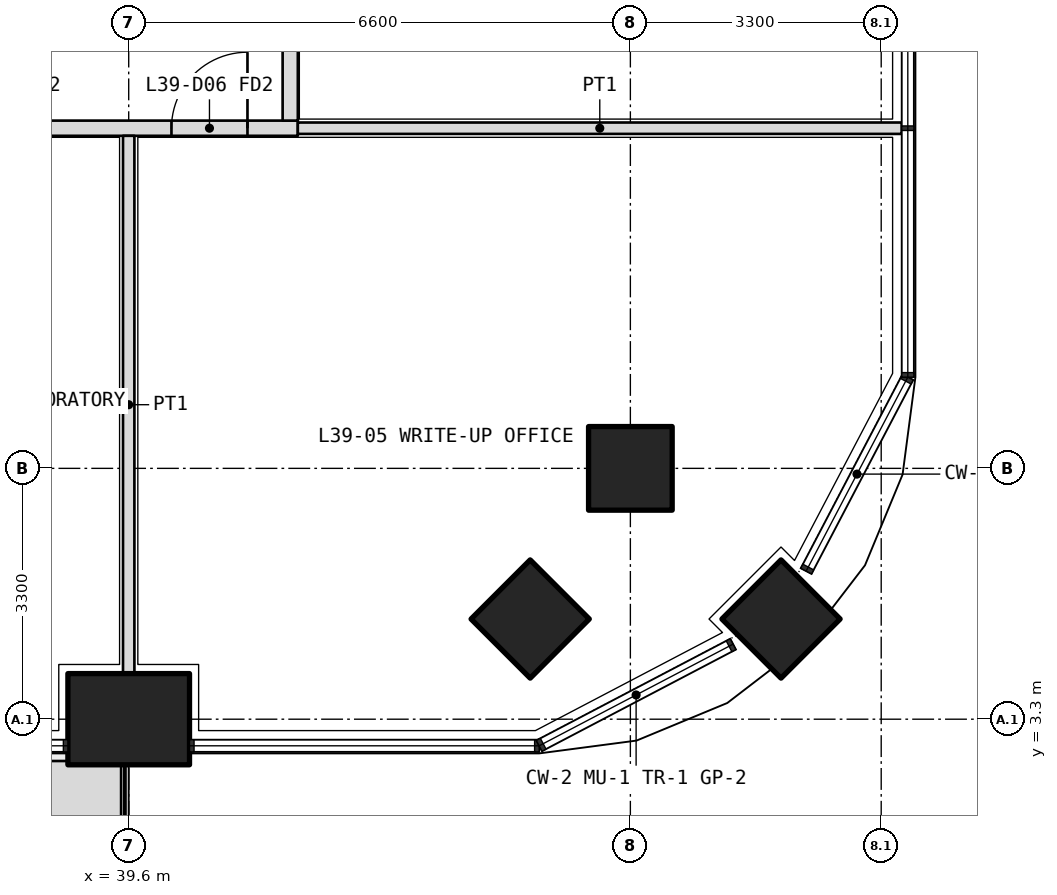
"""IFC4 building model, lengths in metres.
Left out: names, types, materials, properties, quantities, classifications, styles, units other than length and angle.
Written with IfcOpenShell. Run it as: python <this file> out.ifc"""

import sys

from ifc_helpers import new_model, si_unit, direction, frame, frame_2d, origin, origin_2d, place, context, subcontext, project, spatial, polyline, rectangle, outline, extrude, element, fill, save


model = new_model("IFC4")
c1 = context("Model", 3, precision=1e-05, world=origin(), true_north=direction((0.0, 1.0)))
c2 = subcontext(c1, "Body", "Model", "MODEL_VIEW")
j1 = project(units=[si_unit("LENGTHUNIT", "METRE"), si_unit("PLANEANGLEUNIT", "RADIAN")], contexts=[c1])
p1 = place(None, origin())
s1 = spatial("IfcSite", under=j1, at=p1, CompositionType="ELEMENT")
p2 = place(p1, origin())
s2 = spatial("IfcBuilding", under=s1, at=p2, CompositionType="ELEMENT")
p3 = place(p2, frame((0.0, 0.0, 172.5)))
s3 = spatial("IfcBuildingStorey", under=s2, at=p3, CompositionType="ELEMENT", Elevation=172.5)
p4 = place(p3, frame((48.182, 4.618, 0.0), z_axis=(0.0, 0.0, 1.0), x_axis=(0.707106781187, 0.707106781187, 0.0)))
e1 = element("IfcColumn", 1, at=p4, inside=s3, PredefinedType="COLUMN", context=c2, shape_type="SweptSolid", body=[
    extrude(rectangle(XDim=1.1, YDim=1.1, at=origin_2d()), origin(), (0.0, 0.0, 1.0), 4.2),
])
p5 = place(p3, frame((39.6, 3.3, 0.0), z_axis=(0.0, 0.0, 1.0), x_axis=(1.0, 0.0, 0.0)))
e2 = element("IfcColumn", 2, at=p5, inside=s3, PredefinedType="COLUMN", context=c2, shape_type="SweptSolid", body=[
    extrude(rectangle(XDim=1.6, YDim=1.2, at=origin_2d()), origin(), (0.0, 0.0, 1.0), 4.2),
])
for number, where, z_axis, x_axis in (
    (3, (46.2, 6.6, 0.0), (0.0, 0.0, 1.0), (1.0, 0.0, 0.0)),
    (4, (44.882, 4.618, 0.0), (0.0, 0.0, 1.0), (0.707, 0.707, 0.0)),
):
    element("IfcColumn", number, at=place(p3, frame(where, z_axis=z_axis, x_axis=x_axis)), inside=s3, PredefinedType="COLUMN", context=c2, shape_type="SweptSolid", body=[
        extrude(rectangle(XDim=1.1, YDim=1.1, at=origin_2d()), origin(), (0.0, 0.0, 1.0), 4.2),
    ])
p6 = place(p3, origin())
e5 = element("IfcWall", 5, at=p6, inside=s3, PredefinedType="USERDEFINED", context=c2, shape_type="SweptSolid", body=[
    extrude(outline(polyline([(30.45, 1.75), (39.5, 1.75), (39.5, 2.75), (30.45, 2.75), (30.45, 1.75)]), holes=[polyline([(30.6, 1.9), (39.35, 1.9), (39.35, 2.6), (30.6, 2.6), (30.6, 1.9)])]), origin(), (0.0, 0.0, 1.0), 1.05),
])
p7 = place(p3, frame((10.975, 11.075, 0.0), z_axis=(0.0, 0.0, 1.0), x_axis=(1.0, 0.0, 0.0)))
e6 = element("IfcWall", 6, at=p7, inside=s3, PredefinedType="PARTITIONING", context=c2, shape_type="SweptSolid", body=[
    extrude(rectangle(XDim=30.85, YDim=0.2, at=frame_2d((15.425, 0.0))), origin(), (0.0, 0.0, 1.0), 2.85),
])
p8 = place(p7, frame((7.262, 0.0, 0.0)))
e7 = element("IfcOpeningElement", 7, at=p8, cuts=e6, PredefinedType="OPENING", context=c2, shape_type="SweptSolid", body=[
    extrude(rectangle(XDim=1.0, YDim=2.1, at=frame_2d((0.5, 1.05))), frame((0.0, 0.11, 0.0), z_axis=(0.0, -1.0, 0.0), x_axis=(1.0, 0.0, 0.0)), (0.0, 0.0, 1.0), 0.22),
])
p9 = place(p7, frame((16.475, 0.0, 0.0)))
e8 = element("IfcOpeningElement", 8, at=p9, cuts=e6, PredefinedType="OPENING", context=c2, shape_type="SweptSolid", body=[
    extrude(rectangle(XDim=1.2, YDim=2.1, at=frame_2d((0.6, 1.05))), frame((0.0, 0.11, 0.0), z_axis=(0.0, -1.0, 0.0), x_axis=(1.0, 0.0, 0.0)), (0.0, 0.0, 1.0), 0.22),
])
p10 = place(p7, frame((21.525, 0.0, 0.0)))
e9 = element("IfcOpeningElement", 9, at=p10, cuts=e6, PredefinedType="OPENING", context=c2, shape_type="SweptSolid", body=[
    extrude(rectangle(XDim=1.0, YDim=2.1, at=frame_2d((0.5, 1.05))), frame((0.0, 0.11, 0.0), z_axis=(0.0, -1.0, 0.0), x_axis=(1.0, 0.0, 0.0)), (0.0, 0.0, 1.0), 0.22),
])
p11 = place(p7, frame((26.375, 0.0, 0.0)))
e10 = element("IfcOpeningElement", 10, at=p11, cuts=e6, PredefinedType="OPENING", context=c2, shape_type="SweptSolid", body=[
    extrude(rectangle(XDim=1.2, YDim=2.1, at=frame_2d((0.6, 1.05))), frame((0.0, 0.11, 0.0), z_axis=(0.0, -1.0, 0.0), x_axis=(1.0, 0.0, 0.0)), (0.0, 0.0, 1.0), 0.22),
])
p12 = place(p7, frame((29.188, 0.0, 0.0)))
e11 = element("IfcOpeningElement", 11, at=p12, cuts=e6, PredefinedType="OPENING", context=c2, shape_type="SweptSolid", body=[
    extrude(rectangle(XDim=1.0, YDim=2.1, at=frame_2d((0.5, 1.05))), frame((0.0, 0.11, 0.0), z_axis=(0.0, -1.0, 0.0), x_axis=(1.0, 0.0, 0.0)), (0.0, 0.0, 1.0), 0.22),
])
p13 = place(p3, frame((41.725, 11.175, 0.0), z_axis=(0.0, 0.0, 1.0), x_axis=(0.0, 1.0, 0.0)))
e12 = element("IfcWall", 12, at=p13, inside=s3, PredefinedType="PARTITIONING", context=c2, shape_type="SweptSolid", body=[
    extrude(rectangle(XDim=23.85, YDim=0.2, at=frame_2d((11.925, 0.0))), origin(), (0.0, 0.0, 1.0), 2.85),
])
p14 = place(p13, frame((3.762, 0.0, 0.0)))
e13 = element("IfcOpeningElement", 13, at=p14, cuts=e12, PredefinedType="OPENING", context=c2, shape_type="SweptSolid", body=[
    extrude(rectangle(XDim=1.0, YDim=2.1, at=frame_2d((0.5, 1.05))), frame((0.0, 0.11, 0.0), z_axis=(0.0, -1.0, 0.0), x_axis=(1.0, 0.0, 0.0)), (0.0, 0.0, 1.0), 0.22),
])
p15 = place(p13, frame((9.625, 0.0, 0.0)))
e14 = element("IfcOpeningElement", 14, at=p15, cuts=e12, PredefinedType="OPENING", context=c2, shape_type="SweptSolid", body=[
    extrude(rectangle(XDim=1.0, YDim=2.1, at=frame_2d((0.5, 1.05))), frame((0.0, 0.11, 0.0), z_axis=(0.0, -1.0, 0.0), x_axis=(1.0, 0.0, 0.0)), (0.0, 0.0, 1.0), 0.22),
])
p16 = place(p13, frame((12.975, 0.0, 0.0)))
e15 = element("IfcOpeningElement", 15, at=p16, cuts=e12, PredefinedType="OPENING", context=c2, shape_type="SweptSolid", body=[
    extrude(rectangle(XDim=0.9, YDim=2.1, at=frame_2d((0.45, 1.05))), frame((0.0, 0.11, 0.0), z_axis=(0.0, -1.0, 0.0), x_axis=(1.0, 0.0, 0.0)), (0.0, 0.0, 1.0), 0.22),
])
p17 = place(p13, frame((17.925, 0.0, 0.0)))
e16 = element("IfcOpeningElement", 16, at=p17, cuts=e12, PredefinedType="OPENING", context=c2, shape_type="SweptSolid", body=[
    extrude(rectangle(XDim=1.2, YDim=2.1, at=frame_2d((0.6, 1.05))), frame((0.0, 0.11, 0.0), z_axis=(0.0, -1.0, 0.0), x_axis=(1.0, 0.0, 0.0)), (0.0, 0.0, 1.0), 0.22),
])
p18 = place(p13, frame((22.387, 0.0, 0.0)))
e17 = element("IfcOpeningElement", 17, at=p18, cuts=e12, PredefinedType="OPENING", context=c2, shape_type="SweptSolid", body=[
    extrude(rectangle(XDim=1.0, YDim=2.1, at=frame_2d((0.5, 1.05))), frame((0.0, 0.11, 0.0), z_axis=(0.0, -1.0, 0.0), x_axis=(1.0, 0.0, 0.0)), (0.0, 0.0, 1.0), 0.22),
])
p19 = place(p3, frame((49.77, 11.075, 0.0), z_axis=(0.0, 0.0, 1.0), x_axis=(-1.0, 0.0, 0.0)))
e18 = element("IfcWall", 18, at=p19, inside=s3, PredefinedType="PARTITIONING", context=c2, shape_type="SweptSolid", body=[
    extrude(rectangle(XDim=7.945, YDim=0.15, at=frame_2d((3.973, 0.0))), origin(), (0.0, 0.0, 1.0), 2.7),
])
p20 = place(p3, frame((39.6, 3.9, 0.0), z_axis=(0.0, 0.0, 1.0), x_axis=(0.0, 1.0, 0.0)))
e19 = element("IfcWall", 19, at=p20, inside=s3, PredefinedType="PARTITIONING", context=c2, shape_type="SweptSolid", body=[
    extrude(rectangle(XDim=7.075, YDim=0.15, at=frame_2d((3.538, 0.0))), origin(), (0.0, 0.0, 1.0), 2.85),
])
p21 = place(p12, origin())
e20 = element("IfcDoor", 20, at=p21, inside=s3, OperationType="SINGLE_SWING_RIGHT", PredefinedType="DOOR", context=c2, shape_type="SweptSolid", body=[
    extrude(rectangle(XDim=1.0, YDim=2.1, at=frame_2d((0.5, 1.05))), frame((0.0, 0.025, 0.0), z_axis=(0.0, -1.0, 0.0), x_axis=(1.0, 0.0, 0.0)), (0.0, 0.0, 1.0), 0.05),
])
fill(e11, e20)
save(model, sys.argv[1])
